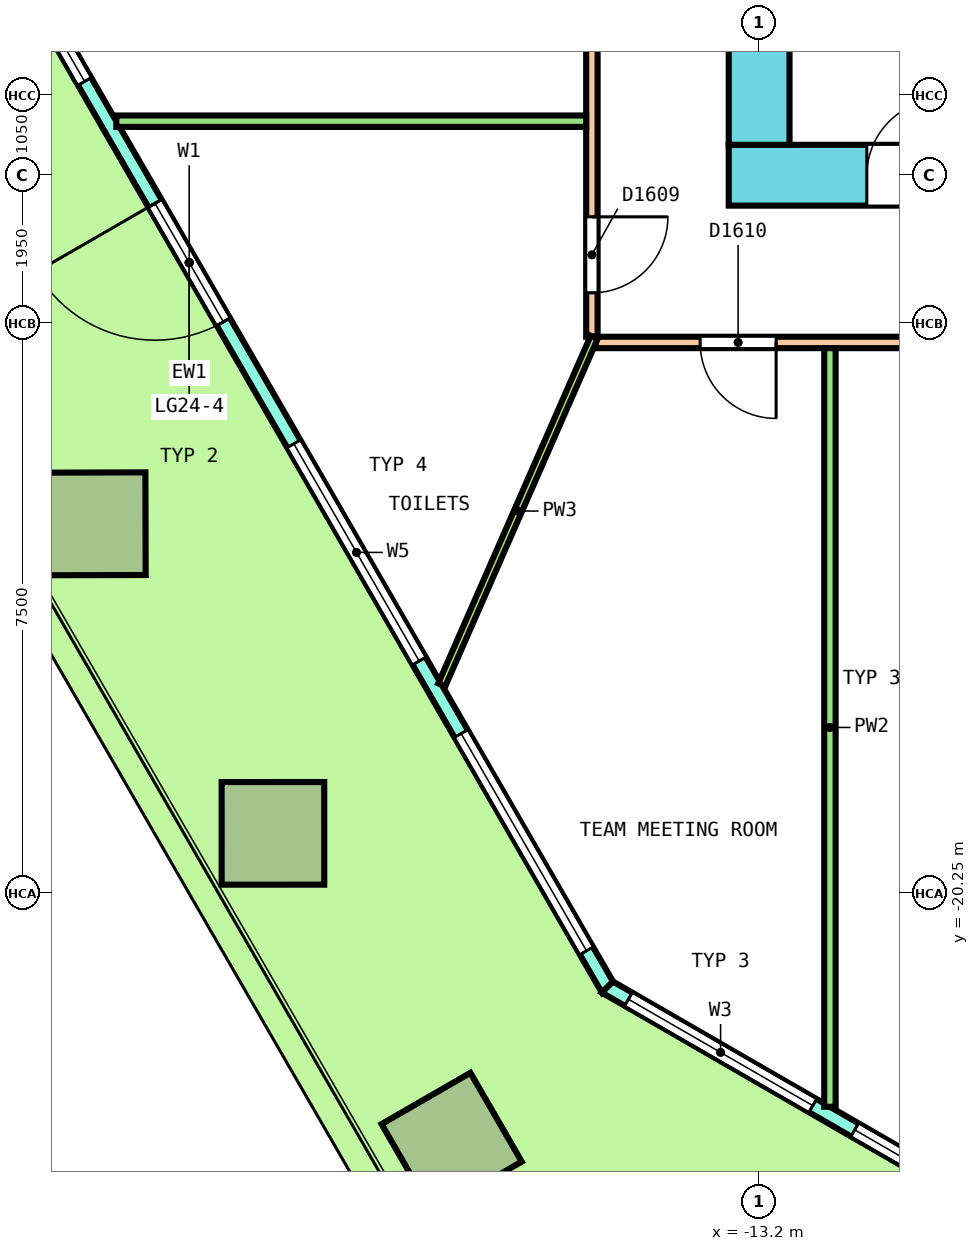
"""IFC4 building model, lengths in metres.
Left out: names, types, materials, properties, quantities, classifications, styles, units other than length and angle.
Written with IfcOpenShell. Run it as: python <this file> out.ifc"""

import sys

from ifc_helpers import new_model, si_unit, direction, frame, frame_2d, origin, origin_2d, place, context, subcontext, project, spatial, polyline, rectangle, outline, extrude, element, fill, save


model = new_model("IFC4")
c1 = context("Model", 3, precision=1e-05, world=origin(), true_north=direction((0.0, 1.0)))
c2 = subcontext(c1, "Body", "Model", "MODEL_VIEW")
j1 = project(units=[si_unit("LENGTHUNIT", "METRE"), si_unit("PLANEANGLEUNIT", "RADIAN")], contexts=[c1])
p1 = place(None, origin())
s1 = spatial("IfcSite", under=j1, at=p1, CompositionType="ELEMENT")
p2 = place(p1, origin())
s2 = spatial("IfcBuilding", under=s1, at=p2, CompositionType="ELEMENT")
p3 = place(p2, frame((0.0, 0.0, 113.2)))
s3 = spatial("IfcBuildingStorey", under=s2, at=p3, CompositionType="ELEMENT", Elevation=113.2)
p4 = place(p3, frame((-21.947, -15.386, 0.0), z_axis=(0.003616758439, -0.006329327268, 0.999973428984), x_axis=(0.498304806076, -0.866971267835, -0.007289786695)))
e1 = element("IfcColumn", 1, at=p4, inside=s3, PredefinedType="COLUMN", context=c2, shape_type="SweptSolid", body=[
    extrude(rectangle(XDim=1.35, YDim=1.35, at=origin_2d()), origin(), (0.0, 0.0, 1.0), 4.05),
])
p5 = place(p3, frame((-19.596, -19.458, 0.0), z_axis=(0.010908253887, -0.018863444567, 0.99976256204), x_axis=(0.500638377412, -0.865382225109, -0.021790354016)))
e2 = element("IfcColumn", 2, at=p5, inside=s3, PredefinedType="COLUMN", context=c2, shape_type="SweptSolid", body=[
    extrude(rectangle(XDim=1.35, YDim=1.35, at=origin_2d()), origin(), (0.0, 0.0, 1.0), 4.051),
])
p6 = place(p3, frame((-17.245, -23.531, 0.0), z_axis=(0.018132595726, -0.031445896907, 0.999340965106), x_axis=(0.865469370655, -0.499974541214, -0.031436071558)))
e3 = element("IfcColumn", 3, at=p6, inside=s3, PredefinedType="COLUMN", context=c2, shape_type="SweptSolid", body=[
    extrude(rectangle(XDim=1.35, YDim=1.35, at=origin_2d()), origin(), (0.0, 0.0, 1.0), 4.053),
])
p7 = place(p3, frame((-26.201, -2.419, 0.0), z_axis=(0.0, 0.0, 1.0), x_axis=(0.500001855394, -0.86602433257, 0.0)))
e4 = element("IfcWall", 4, at=p7, inside=s3, PredefinedType="SOLIDWALL", context=c2, shape_type="SweptSolid", body=[
    extrude(outline(polyline([(-0.027, -0.1), (0.976, -0.1), (1.979, -0.1), (2.982, -0.1), (3.985, -0.1), (4.988, -0.1), (5.991, -0.1), (6.994, -0.1), (7.997, -0.1), (9.0, -0.1), (10.002, -0.1), (11.005, -0.1), (12.008, -0.1), (13.011, -0.1), (14.014, -0.1), (15.017, -0.1), (16.02, -0.1), (17.023, -0.1), (18.026, -0.1), (19.029, -0.1), (20.032, -0.1), (21.035, -0.1), (22.038, -0.1), (21.984, 0.1), (20.986, 0.1), (19.988, 0.1), (18.99, 0.1), (17.992, 0.1), (16.994, 0.1), (15.996, 0.1), (14.998, 0.1), (14.0, 0.1), (13.001, 0.1), (12.003, 0.1), (11.005, 0.1), (10.007, 0.1), (9.009, 0.1), (8.011, 0.1), (7.013, 0.1), (6.015, 0.1), (5.017, 0.1), (4.019, 0.1), (3.021, 0.1), (2.023, 0.1), (1.025, 0.1), (0.027, 0.1), (-0.027, -0.1)])), origin(), (0.0, 0.0, 1.0), 4.1),
])
p8 = place(p7, frame((0.551, 0.0, 0.1)))
e5 = element("IfcOpeningElement", 5, at=p8, cuts=e4, PredefinedType="OPENING", context=c2, shape_type="SweptSolid", body=[
    extrude(rectangle(XDim=3.3, YDim=2.9, at=frame_2d((1.65, 1.45))), frame((0.0, 0.11, 0.0), z_axis=(0.0, -1.0, 0.0), x_axis=(1.0, 0.0, 0.0)), (0.0, 0.0, 1.0), 0.22),
])
p9 = place(p7, frame((4.953, 0.0, 0.1)))
e6 = element("IfcOpeningElement", 6, at=p9, cuts=e4, PredefinedType="OPENING", context=c2, shape_type="SweptSolid", body=[
    extrude(rectangle(XDim=3.3, YDim=2.9, at=frame_2d((1.65, 1.45))), frame((0.0, 0.11, 0.0), z_axis=(0.0, -1.0, 0.0), x_axis=(1.0, 0.0, 0.0)), (0.0, 0.0, 1.0), 0.22),
])
p10 = place(p7, frame((10.105, 0.0, 0.0)))
e7 = element("IfcOpeningElement", 7, at=p10, cuts=e4, PredefinedType="OPENING", context=c2, shape_type="SweptSolid", body=[
    extrude(rectangle(XDim=1.8, YDim=2.4, at=frame_2d((0.9, 1.2))), frame((0.0, 0.11, 0.0), z_axis=(0.0, -1.0, 0.0), x_axis=(1.0, 0.0, 0.0)), (0.0, 0.0, 1.0), 0.22),
])
p11 = place(p7, frame((10.105, 0.0, 2.55)))
e8 = element("IfcOpeningElement", 8, at=p11, cuts=e4, PredefinedType="OPENING", context=c2, shape_type="SweptSolid", body=[
    extrude(rectangle(XDim=1.8, YDim=0.45, at=frame_2d((0.9, 0.225))), frame((0.0, 0.11, 0.0), z_axis=(0.0, -1.0, 0.0), x_axis=(1.0, 0.0, 0.0)), (0.0, 0.0, 1.0), 0.22),
])
p12 = place(p7, frame((13.758, 0.0, 0.1)))
e9 = element("IfcOpeningElement", 9, at=p12, cuts=e4, PredefinedType="OPENING", context=c2, shape_type="SweptSolid", body=[
    extrude(rectangle(XDim=3.3, YDim=2.9, at=frame_2d((1.65, 1.45))), frame((0.0, 0.11, 0.0), z_axis=(0.0, -1.0, 0.0), x_axis=(1.0, 0.0, 0.0)), (0.0, 0.0, 1.0), 0.22),
])
p13 = place(p7, frame((18.16, 0.0, 0.1)))
e10 = element("IfcOpeningElement", 10, at=p13, cuts=e4, PredefinedType="OPENING", context=c2, shape_type="SweptSolid", body=[
    extrude(rectangle(XDim=3.3, YDim=2.9, at=frame_2d((1.65, 1.45))), frame((0.0, 0.11, 0.0), z_axis=(0.0, -1.0, 0.0), x_axis=(1.0, 0.0, 0.0)), (0.0, 0.0, 1.0), 0.22),
])
p14 = place(p3, frame((-15.195, -21.481, 0.0), z_axis=(0.0, 0.0, 1.0), x_axis=(0.866029458321, -0.49999297727, 0.0)))
e11 = element("IfcWall", 11, at=p14, inside=s3, PredefinedType="SOLIDWALL", context=c2, shape_type="SweptSolid", body=[
    extrude(outline(polyline([(-0.027, -0.1), (1.128, -0.1), (2.282, -0.1), (3.437, -0.1), (4.592, -0.1), (5.747, -0.1), (6.901, -0.1), (6.848, 0.1), (5.711, 0.1), (4.574, 0.1), (3.437, 0.1), (2.301, 0.1), (1.164, 0.1), (0.027, 0.1), (-0.027, -0.1)])), origin(), (0.0, 0.0, 1.0), 4.1),
])
p15 = place(p14, frame((0.319, 0.0, 0.1)))
e12 = element("IfcOpeningElement", 12, at=p15, cuts=e11, PredefinedType="OPENING", context=c2, shape_type="SweptSolid", body=[
    extrude(rectangle(XDim=2.8, YDim=2.9, at=frame_2d((1.4, 1.45))), frame((0.0, 0.11, 0.0), z_axis=(0.0, -1.0, 0.0), x_axis=(1.0, 0.0, 0.0)), (0.0, 0.0, 1.0), 0.22),
])
p16 = place(p14, frame((3.756, 0.0, 0.1)))
e13 = element("IfcOpeningElement", 13, at=p16, cuts=e11, PredefinedType="OPENING", context=c2, shape_type="SweptSolid", body=[
    extrude(rectangle(XDim=2.8, YDim=2.9, at=frame_2d((1.4, 1.45))), frame((0.0, 0.11, 0.0), z_axis=(0.0, -1.0, 0.0), x_axis=(1.0, 0.0, 0.0)), (0.0, 0.0, 1.0), 0.22),
])
p17 = place(p3, frame((-13.6, -10.8, 0.0), z_axis=(0.0, 0.0, 1.0), x_axis=(1.0, 0.0, 0.0)))
e14 = element("IfcWall", 14, at=p17, inside=s3, PredefinedType="SHEAR", context=c2, shape_type="SweptSolid", body=[
    extrude(rectangle(XDim=27.2, YDim=0.8, at=frame_2d((13.6, 0.0))), origin(), (0.0, 0.0, 1.0), 4.1),
])
p18 = place(p17, frame((1.817, 0.0, 0.0)))
e15 = element("IfcOpeningElement", 15, at=p18, cuts=e14, PredefinedType="OPENING", context=c2, shape_type="SweptSolid", body=[
    extrude(rectangle(XDim=1.0, YDim=2.1, at=frame_2d((0.5, 1.05))), frame((0.0, 0.41, 0.0), z_axis=(0.0, -1.0, 0.0), x_axis=(1.0, 0.0, 0.0)), (0.0, 0.0, 1.0), 0.82),
])
p19 = place(p17, frame((4.945, 0.0, 0.0)))
e16 = element("IfcOpeningElement", 16, at=p19, cuts=e14, PredefinedType="OPENING", context=c2, shape_type="SweptSolid", body=[
    extrude(rectangle(XDim=1.0, YDim=2.1, at=frame_2d((0.5, 1.05))), frame((0.0, 0.41, 0.0), z_axis=(0.0, -1.0, 0.0), x_axis=(1.0, 0.0, 0.0)), (0.0, 0.0, 1.0), 0.82),
])
p20 = place(p17, frame((8.042, 0.0, 0.0)))
e17 = element("IfcOpeningElement", 17, at=p20, cuts=e14, PredefinedType="OPENING", context=c2, shape_type="SweptSolid", body=[
    extrude(rectangle(XDim=1.0, YDim=2.1, at=frame_2d((0.5, 1.05))), frame((0.0, 0.41, 0.0), z_axis=(0.0, -1.0, 0.0), x_axis=(1.0, 0.0, 0.0)), (0.0, 0.0, 1.0), 0.82),
])
p21 = place(p17, frame((11.139, 0.0, 0.0)))
e18 = element("IfcOpeningElement", 18, at=p21, cuts=e14, PredefinedType="OPENING", context=c2, shape_type="SweptSolid", body=[
    extrude(rectangle(XDim=1.0, YDim=2.1, at=frame_2d((0.5, 1.05))), frame((0.0, 0.41, 0.0), z_axis=(0.0, -1.0, 0.0), x_axis=(1.0, 0.0, 0.0)), (0.0, 0.0, 1.0), 0.82),
])
p22 = place(p17, frame((21.887, 0.0, 0.0)))
e19 = element("IfcOpeningElement", 19, at=p22, cuts=e14, PredefinedType="OPENING", context=c2, shape_type="SweptSolid", body=[
    extrude(rectangle(XDim=1.0, YDim=2.1, at=frame_2d((0.5, 1.05))), frame((0.0, 0.41, 0.0), z_axis=(0.0, -1.0, 0.0), x_axis=(1.0, 0.0, 0.0)), (0.0, 0.0, 1.0), 0.82),
])
p23 = place(p17, frame((15.15, 0.0, 0.0)))
e20 = element("IfcOpeningElement", 20, at=p23, cuts=e14, PredefinedType="OPENING", context=c2, shape_type="SweptSolid", body=[
    extrude(rectangle(XDim=1.2, YDim=2.1, at=frame_2d((0.6, 1.05))), frame((0.0, 0.41, 0.0), z_axis=(0.0, -1.0, 0.0), x_axis=(1.0, 0.0, 0.0)), (0.0, 0.0, 1.0), 0.82),
])
p24 = place(p3, frame((-13.2, -10.4, 0.0), z_axis=(0.0, 0.0, 1.0), x_axis=(0.0, 1.0, 0.0)))
e21 = element("IfcWall", 21, at=p24, inside=s3, PredefinedType="SHEAR", context=c2, shape_type="SweptSolid", body=[
    extrude(rectangle(XDim=20.8, YDim=0.8, at=frame_2d((10.4, 0.0))), origin(), (0.0, 0.0, 1.0), 4.1),
])
p25 = place(p24, frame((9.2, 0.0, 0.0)))
e22 = element("IfcOpeningElement", 22, at=p25, cuts=e21, PredefinedType="OPENING", context=c2, shape_type="SweptSolid", body=[
    extrude(rectangle(XDim=2.4, YDim=2.1, at=frame_2d((1.2, 1.05))), frame((0.0, 0.41, 0.0), z_axis=(0.0, -1.0, 0.0), x_axis=(1.0, 0.0, 0.0)), (0.0, 0.0, 1.0), 0.82),
])
p26 = place(p24, frame((16.1, 0.0, 0.0)))
e23 = element("IfcOpeningElement", 23, at=p26, cuts=e21, PredefinedType="OPENING", context=c2, shape_type="SweptSolid", body=[
    extrude(rectangle(XDim=1.2, YDim=2.1, at=frame_2d((0.6, 1.05))), frame((0.0, 0.41, 0.0), z_axis=(0.0, -1.0, 0.0), x_axis=(1.0, 0.0, 0.0)), (0.0, 0.0, 1.0), 0.82),
])
p27 = place(p24, frame((3.5, 0.0, 0.0)))
e24 = element("IfcOpeningElement", 24, at=p27, cuts=e21, PredefinedType="OPENING", context=c2, shape_type="SweptSolid", body=[
    extrude(rectangle(XDim=1.2, YDim=2.1, at=frame_2d((0.6, 1.05))), frame((0.0, 0.41, 0.0), z_axis=(0.0, -1.0, 0.0), x_axis=(1.0, 0.0, 0.0)), (0.0, 0.0, 1.0), 0.82),
])
p28 = place(p3, frame((-15.4, -12.925, 0.0), z_axis=(0.0, 0.0, 1.0), x_axis=(0.0, 1.0, 0.0)))
e25 = element("IfcWall", 25, at=p28, inside=s3, PredefinedType="PARTITIONING", context=c2, shape_type="SweptSolid", body=[
    extrude(rectangle(XDim=11.286, YDim=0.15, at=frame_2d((5.643, 0.0))), origin(), (0.0, 0.0, 1.0), 3.05),
])
p29 = place(p28, frame((0.578, 0.0, 0.0)))
e26 = element("IfcOpeningElement", 26, at=p29, cuts=e25, PredefinedType="OPENING", context=c2, shape_type="SweptSolid", body=[
    extrude(rectangle(XDim=1.0, YDim=2.1, at=frame_2d((0.5, 1.05))), frame((0.0, 0.085, 0.0), z_axis=(0.0, -1.0, 0.0), x_axis=(1.0, 0.0, 0.0)), (0.0, 0.0, 1.0), 0.17),
])
p30 = place(p3, frame((-15.35, -13.0, 0.0), z_axis=(0.0, 0.0, 1.0), x_axis=(1.0, 0.0, 0.0)))
e27 = element("IfcWall", 27, at=p30, inside=s3, PredefinedType="PARTITIONING", context=c2, shape_type="SweptSolid", body=[
    extrude(rectangle(XDim=30.675, YDim=0.15, at=frame_2d((15.337, 0.0))), origin(), (0.0, 0.0, 1.0), 3.05),
])
p31 = place(p30, frame((1.374, 0.0, 0.0)))
e28 = element("IfcOpeningElement", 28, at=p31, cuts=e27, PredefinedType="OPENING", context=c2, shape_type="SweptSolid", body=[
    extrude(rectangle(XDim=1.0, YDim=2.1, at=frame_2d((0.5, 1.05))), frame((0.0, 0.085, 0.0), z_axis=(0.0, -1.0, 0.0), x_axis=(1.0, 0.0, 0.0)), (0.0, 0.0, 1.0), 0.17),
])
p32 = place(p30, frame((5.114, 0.0, 0.0)))
e29 = element("IfcOpeningElement", 29, at=p32, cuts=e27, PredefinedType="OPENING", context=c2, shape_type="SweptSolid", body=[
    extrude(rectangle(XDim=1.2, YDim=2.1, at=frame_2d((0.6, 1.05))), frame((0.0, 0.085, 0.0), z_axis=(0.0, -1.0, 0.0), x_axis=(1.0, 0.0, 0.0)), (0.0, 0.0, 1.0), 0.17),
])
p33 = place(p30, frame((17.056, 0.0, 0.0)))
e30 = element("IfcOpeningElement", 30, at=p33, cuts=e27, PredefinedType="OPENING", context=c2, shape_type="SweptSolid", body=[
    extrude(rectangle(XDim=1.2, YDim=2.1, at=frame_2d((0.6, 1.05))), frame((0.0, 0.085, 0.0), z_axis=(0.0, -1.0, 0.0), x_axis=(1.0, 0.0, 0.0)), (0.0, 0.0, 1.0), 0.17),
])
p34 = place(p30, frame((26.421, 0.0, 0.0)))
e31 = element("IfcOpeningElement", 31, at=p34, cuts=e27, PredefinedType="OPENING", context=c2, shape_type="SweptSolid", body=[
    extrude(rectangle(XDim=1.2, YDim=2.1, at=frame_2d((0.6, 1.05))), frame((0.0, 0.085, 0.0), z_axis=(0.0, -1.0, 0.0), x_axis=(1.0, 0.0, 0.0)), (0.0, 0.0, 1.0), 0.17),
])
p35 = place(p3, frame((-21.657, -10.089, 0.0), z_axis=(0.0, 0.0, 1.0), x_axis=(1.0, 0.0, 0.0)))
e32 = element("IfcWall", 32, at=p35, inside=s3, PredefinedType="PARTITIONING", context=c2, shape_type="SweptSolid", body=[
    extrude(rectangle(XDim=6.182, YDim=0.15, at=frame_2d((3.091, 0.0))), origin(), (0.0, 0.0, 1.0), 3.05),
])
p36 = place(p3, frame((-12.269, -23.055, 0.0), z_axis=(0.0, 0.0, 1.0), x_axis=(0.0, 1.0, 0.0)))
e33 = element("IfcWall", 33, at=p36, inside=s3, PredefinedType="PARTITIONING", context=c2, shape_type="SweptSolid", body=[
    extrude(rectangle(XDim=9.98, YDim=0.15, at=frame_2d((4.99, 0.0))), origin(), (0.0, 0.0, 1.0), 3.05),
])
p37 = place(p3, frame((-17.375, -17.505, 0.0), z_axis=(0.0, 0.0, 1.0), x_axis=(0.401552160524, 0.915836154767, 0.0)))
e34 = element("IfcWall", 34, at=p37, inside=s3, PredefinedType="PARTITIONING", context=c2, shape_type="SweptSolid", body=[
    extrude(rectangle(XDim=4.994, YDim=0.1, at=frame_2d((2.497, 0.0))), origin(), (0.0, 0.0, 1.0), 3.05),
])
p38 = place(p9, origin())
e35 = element("IfcWindow", 35, at=p38, inside=s3, PartitioningType="SINGLE_PANEL", PredefinedType="WINDOW", context=c2, shape_type="SweptSolid", body=[
    extrude(rectangle(XDim=3.3, YDim=2.9, at=frame_2d((1.65, 1.45))), frame((0.0, 0.03, 0.0), z_axis=(0.0, -1.0, 0.0), x_axis=(1.0, 0.0, 0.0)), (0.0, 0.0, 1.0), 0.06),
])
fill(e6, e35)
p39 = place(p10, origin())
e36 = element("IfcDoor", 36, at=p39, inside=s3, OperationType="DOUBLE_DOOR_SINGLE_SWING", PredefinedType="DOOR", context=c2, shape_type="SweptSolid", body=[
    extrude(rectangle(XDim=1.8, YDim=2.4, at=frame_2d((0.9, 1.2))), frame((0.0, 0.025, 0.0), z_axis=(0.0, -1.0, 0.0), x_axis=(1.0, 0.0, 0.0)), (0.0, 0.0, 1.0), 0.05),
])
fill(e7, e36)
p40 = place(p11, origin())
e37 = element("IfcWindow", 37, at=p40, inside=s3, PartitioningType="SINGLE_PANEL", PredefinedType="WINDOW", context=c2, shape_type="SweptSolid", body=[
    extrude(rectangle(XDim=1.8, YDim=0.45, at=frame_2d((0.9, 0.225))), frame((0.0, 0.03, 0.0), z_axis=(0.0, -1.0, 0.0), x_axis=(1.0, 0.0, 0.0)), (0.0, 0.0, 1.0), 0.06),
])
fill(e8, e37)
p41 = place(p12, origin())
e38 = element("IfcWindow", 38, at=p41, inside=s3, PartitioningType="SINGLE_PANEL", PredefinedType="WINDOW", context=c2, shape_type="SweptSolid", body=[
    extrude(rectangle(XDim=3.3, YDim=2.9, at=frame_2d((1.65, 1.45))), frame((0.0, 0.03, 0.0), z_axis=(0.0, -1.0, 0.0), x_axis=(1.0, 0.0, 0.0)), (0.0, 0.0, 1.0), 0.06),
])
fill(e9, e38)
p42 = place(p13, origin())
e39 = element("IfcWindow", 39, at=p42, inside=s3, PartitioningType="SINGLE_PANEL", PredefinedType="WINDOW", context=c2, shape_type="SweptSolid", body=[
    extrude(rectangle(XDim=3.3, YDim=2.9, at=frame_2d((1.65, 1.45))), frame((0.0, 0.03, 0.0), z_axis=(0.0, -1.0, 0.0), x_axis=(1.0, 0.0, 0.0)), (0.0, 0.0, 1.0), 0.06),
])
fill(e10, e39)
p43 = place(p15, origin())
e40 = element("IfcWindow", 40, at=p43, inside=s3, PartitioningType="SINGLE_PANEL", PredefinedType="WINDOW", context=c2, shape_type="SweptSolid", body=[
    extrude(rectangle(XDim=2.8, YDim=2.9, at=frame_2d((1.4, 1.45))), frame((0.0, 0.03, 0.0), z_axis=(0.0, -1.0, 0.0), x_axis=(1.0, 0.0, 0.0)), (0.0, 0.0, 1.0), 0.06),
])
fill(e12, e40)
p44 = place(p16, origin())
e41 = element("IfcWindow", 41, at=p44, inside=s3, PartitioningType="SINGLE_PANEL", PredefinedType="WINDOW", context=c2, shape_type="SweptSolid", body=[
    extrude(rectangle(XDim=2.8, YDim=2.9, at=frame_2d((1.4, 1.45))), frame((0.0, 0.03, 0.0), z_axis=(0.0, -1.0, 0.0), x_axis=(1.0, 0.0, 0.0)), (0.0, 0.0, 1.0), 0.06),
])
fill(e13, e41)
p45 = place(p18, origin())
e42 = element("IfcDoor", 42, at=p45, inside=s3, OperationType="SINGLE_SWING_LEFT", PredefinedType="DOOR", context=c2, shape_type="SweptSolid", body=[
    extrude(rectangle(XDim=1.0, YDim=2.1, at=frame_2d((0.5, 1.05))), frame((0.0, 0.3, 0.0), z_axis=(0.0, -1.0, 0.0), x_axis=(1.0, 0.0, 0.0)), (0.0, 0.0, 1.0), 0.6),
])
fill(e15, e42)
p46 = place(p29, origin())
e43 = element("IfcDoor", 43, at=p46, inside=s3, OperationType="SINGLE_SWING_LEFT", PredefinedType="DOOR", context=c2, shape_type="SweptSolid", body=[
    extrude(rectangle(XDim=1.0, YDim=2.1, at=frame_2d((0.5, 1.05))), frame((0.0, 0.025, 0.0), z_axis=(0.0, -1.0, 0.0), x_axis=(1.0, 0.0, 0.0)), (0.0, 0.0, 1.0), 0.05),
])
fill(e26, e43)
p47 = place(p31, origin())
e44 = element("IfcDoor", 44, at=p47, inside=s3, OperationType="SINGLE_SWING_LEFT", PredefinedType="DOOR", context=c2, shape_type="SweptSolid", body=[
    extrude(rectangle(XDim=1.0, YDim=2.1, at=frame_2d((0.5, 1.05))), frame((0.0, 0.025, 0.0), z_axis=(0.0, -1.0, 0.0), x_axis=(1.0, 0.0, 0.0)), (0.0, 0.0, 1.0), 0.05),
])
fill(e28, e44)
save(model, sys.argv[1])
